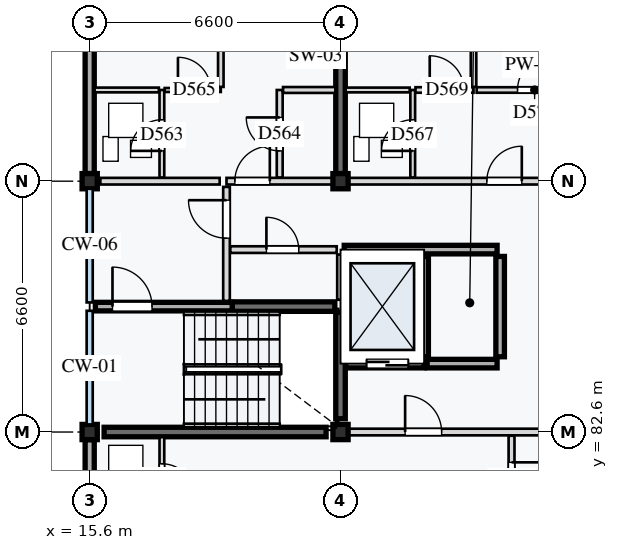
"""IFC4 building model, lengths in metres.
Left out: names, types, materials, properties, quantities, classifications, styles, units other than length and angle.
Written with IfcOpenShell. Run it as: python <this file> out.ifc"""

import sys

from ifc_helpers import new_model, si_unit, direction, frame, frame_2d, origin, origin_2d, place, context, subcontext, project, spatial, rectangle, extrude, element, fill, save


model = new_model("IFC4")
c1 = context("Model", 3, precision=1e-05, world=origin(), true_north=direction((0.0, 1.0)))
c2 = subcontext(c1, "Body", "Model", "MODEL_VIEW")
j1 = project(units=[si_unit("LENGTHUNIT", "METRE"), si_unit("PLANEANGLEUNIT", "RADIAN")], contexts=[c1])
p1 = place(None, origin())
s1 = spatial("IfcSite", under=j1, at=p1, CompositionType="ELEMENT")
p2 = place(p1, origin())
s2 = spatial("IfcBuilding", under=s1, at=p2, CompositionType="ELEMENT")
p3 = place(p2, frame((0.0, 0.0, 56.4)))
s3 = spatial("IfcBuildingStorey", under=s2, at=p3, CompositionType="ELEMENT", Elevation=56.4)
for number, where, z_axis, x_axis in (
    (1, (15.6, 82.6, 0.0), (0.0, 0.0, 1.0), (1.0, 0.0, 0.0)),
    (2, (15.6, 89.2, 0.0), (0.0, 0.0, 1.0), (1.0, 0.0, 0.0)),
    (3, (22.2, 82.6, 0.0), (0.0, 0.0, 1.0), (1.0, 0.0, 0.0)),
    (4, (22.2, 89.2, 0.0), (0.0, 0.0, 1.0), (1.0, 0.0, 0.0)),
):
    element("IfcColumn", number, at=place(p3, frame(where, z_axis=z_axis, x_axis=x_axis)), inside=s3, PredefinedType="COLUMN", context=c2, shape_type="SweptSolid", body=[
        extrude(rectangle(XDim=0.4, YDim=0.4, at=origin_2d()), origin(), (0.0, 0.0, 1.0), 3.2),
    ])
p4 = place(p3, frame((15.98, 82.6, 0.0), z_axis=(0.0, 0.0, 1.0), x_axis=(1.0, 0.0, 0.0)))
e5 = element("IfcWall", 5, at=p4, inside=s3, PredefinedType="SHEAR", context=c2, shape_type="SweptSolid", body=[
    extrude(rectangle(XDim=5.84, YDim=0.25, at=frame_2d((2.92, 0.0))), origin(), (0.0, 0.0, 1.0), 2.93),
])
p5 = place(p3, frame((19.35, 85.9, 0.0), z_axis=(0.0, 0.0, 1.0), x_axis=(1.0, 0.0, 0.0)))
e6 = element("IfcWall", 6, at=p5, inside=s3, PredefinedType="SHEAR", context=c2, shape_type="SweptSolid", body=[
    extrude(rectangle(XDim=2.7, YDim=0.25, at=frame_2d((1.35, 0.0))), origin(), (0.0, 0.0, 1.0), 2.93),
])
p6 = place(p3, frame((22.2, 82.95, 0.0), z_axis=(0.0, 0.0, 1.0), x_axis=(0.0, 1.0, 0.0)))
e7 = element("IfcWall", 7, at=p6, inside=s3, PredefinedType="SHEAR", context=c2, shape_type="SweptSolid", body=[
    extrude(rectangle(XDim=2.8, YDim=0.25, at=frame_2d((1.4, 0.0))), origin(), (0.0, 0.0, 1.0), 2.93),
])
p7 = place(p3, frame((22.2, 89.4, 0.0), z_axis=(0.0, 0.0, 1.0), x_axis=(0.0, 1.0, 0.0)))
e8 = element("IfcWall", 8, at=p7, inside=s3, PredefinedType="SHEAR", context=c2, shape_type="SweptSolid", body=[
    extrude(rectangle(XDim=6.2, YDim=0.25, at=frame_2d((3.1, 0.0))), origin(), (0.0, 0.0, 1.0), 2.93),
])
p8 = place(p3, frame((15.6, 76.2, 0.0), z_axis=(0.0, 0.0, 1.0), x_axis=(0.0, 1.0, 0.0)))
e9 = element("IfcWall", 9, at=p8, inside=s3, PredefinedType="STANDARD", context=c2, shape_type="SweptSolid", body=[
    extrude(rectangle(XDim=6.2, YDim=0.24, at=frame_2d((3.1, 0.0))), origin(), (0.0, 0.0, 1.0), 2.65),
])
p9 = place(p3, frame((15.6, 89.4, 0.0), z_axis=(0.0, 0.0, 1.0), x_axis=(0.0, 1.0, 0.0)))
e10 = element("IfcWall", 10, at=p9, inside=s3, PredefinedType="STANDARD", context=c2, shape_type="SweptSolid", body=[
    extrude(rectangle(XDim=6.2, YDim=0.24, at=frame_2d((3.1, 0.0))), origin(), (0.0, 0.0, 1.0), 2.65),
])
p10 = place(p3, frame((15.75, 85.9, 0.0), z_axis=(0.0, 0.0, 1.0), x_axis=(1.0, 0.0, 0.0)))
e11 = element("IfcWall", 11, at=p10, inside=s3, PredefinedType="STANDARD", context=c2, shape_type="SweptSolid", body=[
    extrude(rectangle(XDim=3.6, YDim=0.225, at=frame_2d((1.8, 0.0))), origin(), (0.0, 0.0, 1.0), 2.93),
])
p11 = place(p10, frame((0.45, 0.0, 0.0)))
e12 = element("IfcOpeningElement", 12, at=p11, cuts=e11, PredefinedType="OPENING", context=c2, shape_type="SweptSolid", body=[
    extrude(rectangle(XDim=1.04, YDim=2.12, at=frame_2d((0.52, 1.06))), frame((0.0, 0.123, 0.0), z_axis=(0.0, -1.0, 0.0), x_axis=(1.0, 0.0, 0.0)), (0.0, 0.0, 1.0), 0.245),
])
p12 = place(p3, frame((19.2, 86.05, 0.0), z_axis=(0.0, 0.0, 1.0), x_axis=(0.0, 1.0, 0.0)))
e13 = element("IfcWall", 13, at=p12, inside=s3, PredefinedType="PARTITIONING", context=c2, shape_type="SweptSolid", body=[
    extrude(rectangle(XDim=3.0, YDim=0.175, at=frame_2d((1.5, 0.0))), origin(), (0.0, 0.0, 1.0), 2.93),
])
p13 = place(p12, frame((1.65, 0.0, 0.0)))
e14 = element("IfcOpeningElement", 14, at=p13, cuts=e13, PredefinedType="OPENING", context=c2, shape_type="SweptSolid", body=[
    extrude(rectangle(XDim=1.0, YDim=2.1, at=frame_2d((0.5, 1.05))), frame((0.0, 0.097, 0.0), z_axis=(0.0, -1.0, 0.0), x_axis=(1.0, 0.0, 0.0)), (0.0, 0.0, 1.0), 0.195),
])
p14 = place(p3, frame((19.3, 87.4, 0.0), z_axis=(0.0, 0.0, 1.0), x_axis=(1.0, 0.0, 0.0)))
e15 = element("IfcWall", 15, at=p14, inside=s3, PredefinedType="PARTITIONING", context=c2, shape_type="SweptSolid", body=[
    extrude(rectangle(XDim=2.8, YDim=0.175, at=frame_2d((1.4, 0.0))), origin(), (0.0, 0.0, 1.0), 2.93),
])
p15 = place(p14, frame((0.95, 0.0, 0.0)))
e16 = element("IfcOpeningElement", 16, at=p15, cuts=e15, PredefinedType="OPENING", context=c2, shape_type="SweptSolid", body=[
    extrude(rectangle(XDim=0.85, YDim=2.0, at=frame_2d((0.425, 1.0))), frame((0.0, 0.097, 0.0), z_axis=(0.0, -1.0, 0.0), x_axis=(1.0, 0.0, 0.0)), (0.0, 0.0, 1.0), 0.195),
])
p16 = place(p3, frame((22.2, 86.08, 0.0), z_axis=(0.0, 0.0, 1.0), x_axis=(0.0, 1.0, 0.0)))
e17 = element("IfcWall", 17, at=p16, inside=s3, PredefinedType="PARTITIONING", context=c2, shape_type="SweptSolid", body=[
    extrude(rectangle(XDim=1.19, YDim=0.175, at=frame_2d((0.595, 0.0))), origin(), (0.0, 0.0, 1.0), 2.93),
])
p17 = place(p3, frame((22.335, 84.4, 0.0), z_axis=(0.0, 0.0, 1.0), x_axis=(1.0, 0.0, 0.0)))
e18 = element("IfcWall", 18, at=p17, inside=s3, PredefinedType="STANDARD", context=c2, shape_type="SweptSolid", body=[
    extrude(rectangle(XDim=2.065, YDim=0.225, at=frame_2d((1.032, 0.0))), origin(), (0.0, 0.0, 1.0), 2.93),
])
p18 = place(p17, frame((0.55, 0.0, 0.0)))
e19 = element("IfcOpeningElement", 19, at=p18, cuts=e18, PredefinedType="OPENING", context=c2, shape_type="SweptSolid", body=[
    extrude(rectangle(XDim=1.1, YDim=2.1, at=frame_2d((0.55, 1.05))), frame((0.0, 0.123, 0.0), z_axis=(0.0, -1.0, 0.0), x_axis=(1.0, 0.0, 0.0)), (0.0, 0.0, 1.0), 0.245),
])
p19 = place(p3, frame((24.48, 84.4, 0.0), z_axis=(0.0, 0.0, 1.0), x_axis=(1.0, 0.0, 0.0)))
e20 = element("IfcWall", 20, at=p19, inside=s3, PredefinedType="STANDARD", context=c2, shape_type="SweptSolid", body=[
    extrude(rectangle(XDim=1.84, YDim=0.225, at=frame_2d((0.92, 0.0))), origin(), (0.0, 0.0, 1.0), 2.93),
])
p20 = place(p3, frame((22.298, 87.4, 0.0), z_axis=(0.0, 0.0, 1.0), x_axis=(1.0, 0.0, 0.0)))
e21 = element("IfcWall", 21, at=p20, inside=s3, PredefinedType="STANDARD", context=c2, shape_type="SweptSolid", body=[
    extrude(rectangle(XDim=4.022, YDim=0.225, at=frame_2d((2.011, 0.0))), origin(), (0.0, 0.0, 1.0), 2.93),
])
for number, where, z_axis, x_axis in (
    (22, (24.4, 84.58, 0.0), (0.0, 0.0, 1.0), (0.0, 1.0, 0.0)),
    (23, (26.4, 84.58, 0.0), (0.0, 0.0, 1.0), (0.0, 1.0, 0.0)),
):
    element("IfcWall", number, at=place(p3, frame(where, z_axis=z_axis, x_axis=x_axis)), inside=s3, PredefinedType="STANDARD", context=c2, shape_type="SweptSolid", body=[
        extrude(rectangle(XDim=2.64, YDim=0.225, at=frame_2d((1.32, 0.0))), origin(), (0.0, 0.0, 1.0), 2.93),
    ])
p21 = place(p3, frame((22.2, 82.6, 0.0), z_axis=(0.0, 0.0, 1.0), x_axis=(1.0, 0.0, 0.0)))
e24 = element("IfcWall", 24, at=p21, inside=s3, PredefinedType="PARTITIONING", context=c2, shape_type="SweptSolid", body=[
    extrude(rectangle(XDim=6.6, YDim=0.175, at=frame_2d((3.3, 0.0))), origin(), (0.0, 0.0, 1.0), 2.55),
])
p22 = place(p21, frame((1.7, 0.0, 0.0)))
e25 = element("IfcOpeningElement", 25, at=p22, cuts=e24, PredefinedType="OPENING", context=c2, shape_type="SweptSolid", body=[
    extrude(rectangle(XDim=0.96, YDim=2.18, at=frame_2d((0.48, 1.09))), frame((0.0, 0.097, 0.0), z_axis=(0.0, -1.0, 0.0), x_axis=(1.0, 0.0, 0.0)), (0.0, 0.0, 1.0), 0.195),
])
p23 = place(p3, frame((17.5, 82.465, 0.0), z_axis=(0.0, 0.0, 1.0), x_axis=(0.0, -1.0, 0.0)))
e26 = element("IfcWall", 26, at=p23, inside=s3, PredefinedType="PARTITIONING", context=c2, shape_type="SweptSolid", body=[
    extrude(rectangle(XDim=2.265, YDim=0.125, at=frame_2d((1.133, 0.0))), origin(), (0.0, 0.0, 1.0), 2.93),
])
p24 = place(p23, frame((0.7, 0.0, 0.0)))
e27 = element("IfcOpeningElement", 27, at=p24, cuts=e26, PredefinedType="OPENING", context=c2, shape_type="SweptSolid", body=[
    extrude(rectangle(XDim=0.85, YDim=2.04, at=frame_2d((0.425, 1.02))), frame((0.0, 0.073, 0.0), z_axis=(0.0, -1.0, 0.0), x_axis=(1.0, 0.0, 0.0)), (0.0, 0.0, 1.0), 0.145),
])
p25 = place(p3, frame((26.7, 82.502, 0.0), z_axis=(0.0, 0.0, 1.0), x_axis=(0.0, -1.0, 0.0)))
e28 = element("IfcWall", 28, at=p25, inside=s3, PredefinedType="PARTITIONING", context=c2, shape_type="SweptSolid", body=[
    extrude(rectangle(XDim=2.302, YDim=0.155, at=frame_2d((1.151, 0.0))), origin(), (0.0, 0.0, 1.0), 2.93),
])
p26 = place(p25, frame((0.7, 0.0, 0.0)))
e29 = element("IfcOpeningElement", 29, at=p26, cuts=e28, PredefinedType="OPENING", context=c2, shape_type="SweptSolid", body=[
    extrude(rectangle(XDim=0.98, YDim=2.12, at=frame_2d((0.49, 1.06))), frame((0.0, 0.087, 0.0), z_axis=(0.0, -1.0, 0.0), x_axis=(1.0, 0.0, 0.0)), (0.0, 0.0, 1.0), 0.175),
])
p27 = place(p3, frame((15.88, 89.2, 0.0), z_axis=(0.0, 0.0, 1.0), x_axis=(1.0, 0.0, 0.0)))
e30 = element("IfcWall", 30, at=p27, inside=s3, PredefinedType="PARTITIONING", context=c2, shape_type="SweptSolid", body=[
    extrude(rectangle(XDim=3.14, YDim=0.175, at=frame_2d((1.57, 0.0))), origin(), (0.0, 0.0, 1.0), 2.55),
])
p28 = place(p3, frame((19.2, 89.2, 0.0), z_axis=(0.0, 0.0, 1.0), x_axis=(1.0, 0.0, 0.0)))
e31 = element("IfcWall", 31, at=p28, inside=s3, PredefinedType="PARTITIONING", context=c2, shape_type="SweptSolid", body=[
    extrude(rectangle(XDim=3.0, YDim=0.175, at=frame_2d((1.5, 0.0))), origin(), (0.0, 0.0, 1.0), 2.55),
])
p29 = place(p28, frame((0.22, 0.0, 0.0)))
e32 = element("IfcOpeningElement", 32, at=p29, cuts=e31, PredefinedType="OPENING", context=c2, shape_type="SweptSolid", body=[
    extrude(rectangle(XDim=0.92, YDim=2.14, at=frame_2d((0.46, 1.07))), frame((0.0, 0.097, 0.0), z_axis=(0.0, -1.0, 0.0), x_axis=(1.0, 0.0, 0.0)), (0.0, 0.0, 1.0), 0.195),
])
p30 = place(p3, frame((17.5, 89.298, 0.0), z_axis=(0.0, 0.0, 1.0), x_axis=(0.0, 1.0, 0.0)))
e33 = element("IfcWall", 33, at=p30, inside=s3, PredefinedType="PARTITIONING", context=c2, shape_type="SweptSolid", body=[
    extrude(rectangle(XDim=2.302, YDim=0.125, at=frame_2d((1.151, 0.0))), origin(), (0.0, 0.0, 1.0), 2.93),
])
p31 = place(p30, frame((0.7, 0.0, 0.0)))
e34 = element("IfcOpeningElement", 34, at=p31, cuts=e33, PredefinedType="OPENING", context=c2, shape_type="SweptSolid", body=[
    extrude(rectangle(XDim=0.82, YDim=2.05, at=frame_2d((0.41, 1.025))), frame((0.0, 0.073, 0.0), z_axis=(0.0, -1.0, 0.0), x_axis=(1.0, 0.0, 0.0)), (0.0, 0.0, 1.0), 0.145),
])
p32 = place(p3, frame((15.73, 91.6, 0.0), z_axis=(0.0, 0.0, 1.0), x_axis=(1.0, 0.0, 0.0)))
e35 = element("IfcWall", 35, at=p32, inside=s3, PredefinedType="PARTITIONING", context=c2, shape_type="SweptSolid", body=[
    extrude(rectangle(XDim=1.69, YDim=0.125, at=frame_2d((0.845, 0.0))), origin(), (0.0, 0.0, 1.0), 2.93),
])
p33 = place(p3, frame((20.6, 89.298, 0.0), z_axis=(0.0, 0.0, 1.0), x_axis=(0.0, 1.0, 0.0)))
e36 = element("IfcWall", 36, at=p33, inside=s3, PredefinedType="PARTITIONING", context=c2, shape_type="SweptSolid", body=[
    extrude(rectangle(XDim=2.302, YDim=0.155, at=frame_2d((1.151, 0.0))), origin(), (0.0, 0.0, 1.0), 2.93),
])
p34 = place(p33, frame((0.7, 0.0, 0.0)))
e37 = element("IfcOpeningElement", 37, at=p34, cuts=e36, PredefinedType="OPENING", context=c2, shape_type="SweptSolid", body=[
    extrude(rectangle(XDim=0.88, YDim=2.16, at=frame_2d((0.44, 1.08))), frame((0.0, 0.087, 0.0), z_axis=(0.0, -1.0, 0.0), x_axis=(1.0, 0.0, 0.0)), (0.0, 0.0, 1.0), 0.175),
])
p35 = place(p3, frame((20.688, 91.6, 0.0), z_axis=(0.0, 0.0, 1.0), x_axis=(1.0, 0.0, 0.0)))
e38 = element("IfcWall", 38, at=p35, inside=s3, PredefinedType="PARTITIONING", context=c2, shape_type="SweptSolid", body=[
    extrude(rectangle(XDim=1.377, YDim=0.155, at=frame_2d((0.689, 0.0))), origin(), (0.0, 0.0, 1.0), 2.93),
])
p36 = place(p3, frame((17.573, 91.6, 0.0), z_axis=(0.0, 0.0, 1.0), x_axis=(1.0, 0.0, 0.0)))
e39 = element("IfcWall", 39, at=p36, inside=s3, PredefinedType="PARTITIONING", context=c2, shape_type="SweptSolid", body=[
    extrude(rectangle(XDim=1.478, YDim=0.105, at=frame_2d((0.739, 0.0))), origin(), (0.0, 0.0, 1.0), 2.93),
])
p37 = place(p36, frame((0.35, 0.0, 0.0)))
e40 = element("IfcOpeningElement", 40, at=p37, cuts=e39, PredefinedType="OPENING", context=c2, shape_type="SweptSolid", body=[
    extrude(rectangle(XDim=0.86, YDim=2.12, at=frame_2d((0.43, 1.06))), frame((0.0, 0.062, 0.0), z_axis=(0.0, -1.0, 0.0), x_axis=(1.0, 0.0, 0.0)), (0.0, 0.0, 1.0), 0.125),
])
p38 = place(p3, frame((19.05, 91.68, 0.0), z_axis=(0.0, 0.0, 1.0), x_axis=(0.0, 1.0, 0.0)))
e41 = element("IfcWall", 41, at=p38, inside=s3, PredefinedType="PARTITIONING", context=c2, shape_type="SweptSolid", body=[
    extrude(rectangle(XDim=3.99, YDim=0.145, at=frame_2d((1.995, 0.0))), origin(), (0.0, 0.0, 1.0), 2.93),
])
p39 = place(p3, frame((22.2, 89.2, 0.0), z_axis=(0.0, 0.0, 1.0), x_axis=(1.0, 0.0, 0.0)))
e42 = element("IfcWall", 42, at=p39, inside=s3, PredefinedType="PARTITIONING", context=c2, shape_type="SweptSolid", body=[
    extrude(rectangle(XDim=6.6, YDim=0.175, at=frame_2d((3.3, 0.0))), origin(), (0.0, 0.0, 1.0), 2.55),
])
p40 = place(p39, frame((3.85, 0.0, 0.0)))
e43 = element("IfcOpeningElement", 43, at=p40, cuts=e42, PredefinedType="OPENING", context=c2, shape_type="SweptSolid", body=[
    extrude(rectangle(XDim=0.92, YDim=2.14, at=frame_2d((0.46, 1.07))), frame((0.0, 0.097, 0.0), z_axis=(0.0, -1.0, 0.0), x_axis=(1.0, 0.0, 0.0)), (0.0, 0.0, 1.0), 0.195),
])
p41 = place(p3, frame((24.1, 89.298, 0.0), z_axis=(0.0, 0.0, 1.0), x_axis=(0.0, 1.0, 0.0)))
e44 = element("IfcWall", 44, at=p41, inside=s3, PredefinedType="PARTITIONING", context=c2, shape_type="SweptSolid", body=[
    extrude(rectangle(XDim=2.302, YDim=0.125, at=frame_2d((1.151, 0.0))), origin(), (0.0, 0.0, 1.0), 2.93),
])
p42 = place(p41, frame((0.7, 0.0, 0.0)))
e45 = element("IfcOpeningElement", 45, at=p42, cuts=e44, PredefinedType="OPENING", context=c2, shape_type="SweptSolid", body=[
    extrude(rectangle(XDim=0.82, YDim=2.05, at=frame_2d((0.41, 1.025))), frame((0.0, 0.073, 0.0), z_axis=(0.0, -1.0, 0.0), x_axis=(1.0, 0.0, 0.0)), (0.0, 0.0, 1.0), 0.145),
])
p43 = place(p3, frame((22.335, 91.6, 0.0), z_axis=(0.0, 0.0, 1.0), x_axis=(1.0, 0.0, 0.0)))
e46 = element("IfcWall", 46, at=p43, inside=s3, PredefinedType="PARTITIONING", context=c2, shape_type="SweptSolid", body=[
    extrude(rectangle(XDim=1.685, YDim=0.125, at=frame_2d((0.843, 0.0))), origin(), (0.0, 0.0, 1.0), 2.93),
])
p44 = place(p3, frame((24.173, 91.6, 0.0), z_axis=(0.0, 0.0, 1.0), x_axis=(1.0, 0.0, 0.0)))
e47 = element("IfcWall", 47, at=p44, inside=s3, PredefinedType="PARTITIONING", context=c2, shape_type="SweptSolid", body=[
    extrude(rectangle(XDim=1.527, YDim=0.145, at=frame_2d((0.764, 0.0))), origin(), (0.0, 0.0, 1.0), 2.93),
])
p45 = place(p44, frame((0.375, 0.0, 0.0)))
e48 = element("IfcOpeningElement", 48, at=p45, cuts=e47, PredefinedType="OPENING", context=c2, shape_type="SweptSolid", body=[
    extrude(rectangle(XDim=0.9, YDim=2.1, at=frame_2d((0.45, 1.05))), frame((0.0, 0.083, 0.0), z_axis=(0.0, -1.0, 0.0), x_axis=(1.0, 0.0, 0.0)), (0.0, 0.0, 1.0), 0.165),
])
p46 = place(p3, frame((25.7, 91.683, 0.0), z_axis=(0.0, 0.0, 1.0), x_axis=(0.0, 1.0, 0.0)))
e49 = element("IfcWall", 49, at=p46, inside=s3, PredefinedType="PARTITIONING", context=c2, shape_type="SweptSolid", body=[
    extrude(rectangle(XDim=3.987, YDim=0.145, at=frame_2d((1.994, 0.0))), origin(), (0.0, 0.0, 1.0), 2.93),
])
p47 = place(p3, frame((25.782, 91.6, 0.0), z_axis=(0.0, 0.0, 1.0), x_axis=(1.0, 0.0, 0.0)))
e50 = element("IfcWall", 50, at=p47, inside=s3, PredefinedType="PARTITIONING", context=c2, shape_type="SweptSolid", body=[
    extrude(rectangle(XDim=2.917, YDim=0.145, at=frame_2d((1.459, 0.0))), origin(), (0.0, 0.0, 1.0), 2.93),
])
p48 = place(p47, frame((1.075, 0.0, 0.0)))
e51 = element("IfcOpeningElement", 51, at=p48, cuts=e50, PredefinedType="OPENING", context=c2, shape_type="SweptSolid", body=[
    extrude(rectangle(XDim=0.9, YDim=2.16, at=frame_2d((0.45, 1.08))), frame((0.0, 0.083, 0.0), z_axis=(0.0, -1.0, 0.0), x_axis=(1.0, 0.0, 0.0)), (0.0, 0.0, 1.0), 0.165),
])
p49 = place(p11, origin())
e52 = element("IfcDoor", 52, at=p49, inside=s3, OperationType="SINGLE_SWING_LEFT", PredefinedType="DOOR", context=c2, shape_type="SweptSolid", body=[
    extrude(rectangle(XDim=1.04, YDim=2.12, at=frame_2d((0.52, 1.06))), frame((0.0, 0.025, 0.0), z_axis=(0.0, -1.0, 0.0), x_axis=(1.0, 0.0, 0.0)), (0.0, 0.0, 1.0), 0.05),
])
fill(e12, e52)
p50 = place(p13, origin())
e53 = element("IfcDoor", 53, at=p50, inside=s3, OperationType="SINGLE_SWING_RIGHT", PredefinedType="DOOR", context=c2, shape_type="SweptSolid", body=[
    extrude(rectangle(XDim=1.0, YDim=2.1, at=frame_2d((0.5, 1.05))), frame((0.0, 0.025, 0.0), z_axis=(0.0, -1.0, 0.0), x_axis=(1.0, 0.0, 0.0)), (0.0, 0.0, 1.0), 0.05),
])
fill(e14, e53)
p51 = place(p15, origin())
e54 = element("IfcDoor", 54, at=p51, inside=s3, OperationType="SINGLE_SWING_LEFT", PredefinedType="DOOR", context=c2, shape_type="SweptSolid", body=[
    extrude(rectangle(XDim=0.85, YDim=2.0, at=frame_2d((0.425, 1.0))), frame((0.0, 0.025, 0.0), z_axis=(0.0, -1.0, 0.0), x_axis=(1.0, 0.0, 0.0)), (0.0, 0.0, 1.0), 0.05),
])
fill(e16, e54)
p52 = place(p18, origin())
e55 = element("IfcDoor", 55, at=p52, inside=s3, OperationType="DOUBLE_DOOR_SLIDING", PredefinedType="DOOR", context=c2, shape_type="SweptSolid", body=[
    extrude(rectangle(XDim=1.1, YDim=2.1, at=frame_2d((0.55, 1.05))), frame((0.0, 0.025, 0.0), z_axis=(0.0, -1.0, 0.0), x_axis=(1.0, 0.0, 0.0)), (0.0, 0.0, 1.0), 0.05),
])
fill(e19, e55)
p53 = place(p22, origin())
e56 = element("IfcDoor", 56, at=p53, inside=s3, OperationType="SINGLE_SWING_LEFT", PredefinedType="DOOR", context=c2, shape_type="SweptSolid", body=[
    extrude(rectangle(XDim=0.96, YDim=2.18, at=frame_2d((0.48, 1.09))), frame((0.0, 0.025, 0.0), z_axis=(0.0, -1.0, 0.0), x_axis=(1.0, 0.0, 0.0)), (0.0, 0.0, 1.0), 0.05),
])
fill(e25, e56)
p54 = place(p24, origin())
e57 = element("IfcDoor", 57, at=p54, inside=s3, OperationType="SINGLE_SWING_RIGHT", PredefinedType="DOOR", context=c2, shape_type="SweptSolid", body=[
    extrude(rectangle(XDim=0.85, YDim=2.04, at=frame_2d((0.425, 1.02))), frame((0.0, 0.025, 0.0), z_axis=(0.0, -1.0, 0.0), x_axis=(1.0, 0.0, 0.0)), (0.0, 0.0, 1.0), 0.05),
])
fill(e27, e57)
p55 = place(p26, origin())
e58 = element("IfcDoor", 58, at=p55, inside=s3, OperationType="SINGLE_SWING_LEFT", PredefinedType="DOOR", context=c2, shape_type="SweptSolid", body=[
    extrude(rectangle(XDim=0.98, YDim=2.12, at=frame_2d((0.49, 1.06))), frame((0.0, 0.025, 0.0), z_axis=(0.0, -1.0, 0.0), x_axis=(1.0, 0.0, 0.0)), (0.0, 0.0, 1.0), 0.05),
])
fill(e29, e58)
p56 = place(p29, origin())
e59 = element("IfcDoor", 59, at=p56, inside=s3, OperationType="SINGLE_SWING_RIGHT", PredefinedType="DOOR", context=c2, shape_type="SweptSolid", body=[
    extrude(rectangle(XDim=0.92, YDim=2.14, at=frame_2d((0.46, 1.07))), frame((0.0, 0.025, 0.0), z_axis=(0.0, -1.0, 0.0), x_axis=(1.0, 0.0, 0.0)), (0.0, 0.0, 1.0), 0.05),
])
fill(e32, e59)
p57 = place(p31, origin())
e60 = element("IfcDoor", 60, at=p57, inside=s3, OperationType="SINGLE_SWING_LEFT", PredefinedType="DOOR", context=c2, shape_type="SweptSolid", body=[
    extrude(rectangle(XDim=0.82, YDim=2.05, at=frame_2d((0.41, 1.025))), frame((0.0, 0.025, 0.0), z_axis=(0.0, -1.0, 0.0), x_axis=(1.0, 0.0, 0.0)), (0.0, 0.0, 1.0), 0.05),
])
fill(e34, e60)
p58 = place(p34, origin())
e61 = element("IfcDoor", 61, at=p58, inside=s3, OperationType="SINGLE_SWING_RIGHT", PredefinedType="DOOR", context=c2, shape_type="SweptSolid", body=[
    extrude(rectangle(XDim=0.88, YDim=2.16, at=frame_2d((0.44, 1.08))), frame((0.0, 0.025, 0.0), z_axis=(0.0, -1.0, 0.0), x_axis=(1.0, 0.0, 0.0)), (0.0, 0.0, 1.0), 0.05),
])
fill(e37, e61)
p59 = place(p37, origin())
e62 = element("IfcDoor", 62, at=p59, inside=s3, OperationType="SINGLE_SWING_LEFT", PredefinedType="DOOR", context=c2, shape_type="SweptSolid", body=[
    extrude(rectangle(XDim=0.86, YDim=2.12, at=frame_2d((0.43, 1.06))), frame((0.0, 0.025, 0.0), z_axis=(0.0, -1.0, 0.0), x_axis=(1.0, 0.0, 0.0)), (0.0, 0.0, 1.0), 0.05),
])
fill(e40, e62)
p60 = place(p40, origin())
e63 = element("IfcDoor", 63, at=p60, inside=s3, OperationType="SINGLE_SWING_RIGHT", PredefinedType="DOOR", context=c2, shape_type="SweptSolid", body=[
    extrude(rectangle(XDim=0.92, YDim=2.14, at=frame_2d((0.46, 1.07))), frame((0.0, 0.025, 0.0), z_axis=(0.0, -1.0, 0.0), x_axis=(1.0, 0.0, 0.0)), (0.0, 0.0, 1.0), 0.05),
])
fill(e43, e63)
p61 = place(p42, origin())
e64 = element("IfcDoor", 64, at=p61, inside=s3, OperationType="SINGLE_SWING_LEFT", PredefinedType="DOOR", context=c2, shape_type="SweptSolid", body=[
    extrude(rectangle(XDim=0.82, YDim=2.05, at=frame_2d((0.41, 1.025))), frame((0.0, 0.025, 0.0), z_axis=(0.0, -1.0, 0.0), x_axis=(1.0, 0.0, 0.0)), (0.0, 0.0, 1.0), 0.05),
])
fill(e45, e64)
p62 = place(p45, origin())
e65 = element("IfcDoor", 65, at=p62, inside=s3, OperationType="SINGLE_SWING_LEFT", PredefinedType="DOOR", context=c2, shape_type="SweptSolid", body=[
    extrude(rectangle(XDim=0.9, YDim=2.1, at=frame_2d((0.45, 1.05))), frame((0.0, 0.025, 0.0), z_axis=(0.0, -1.0, 0.0), x_axis=(1.0, 0.0, 0.0)), (0.0, 0.0, 1.0), 0.05),
])
fill(e48, e65)
p63 = place(p48, origin())
e66 = element("IfcDoor", 66, at=p63, inside=s3, OperationType="SINGLE_SWING_RIGHT", PredefinedType="DOOR", context=c2, shape_type="SweptSolid", body=[
    extrude(rectangle(XDim=0.9, YDim=2.16, at=frame_2d((0.45, 1.08))), frame((0.0, 0.025, 0.0), z_axis=(0.0, -1.0, 0.0), x_axis=(1.0, 0.0, 0.0)), (0.0, 0.0, 1.0), 0.05),
])
fill(e51, e66)
save(model, sys.argv[1])
